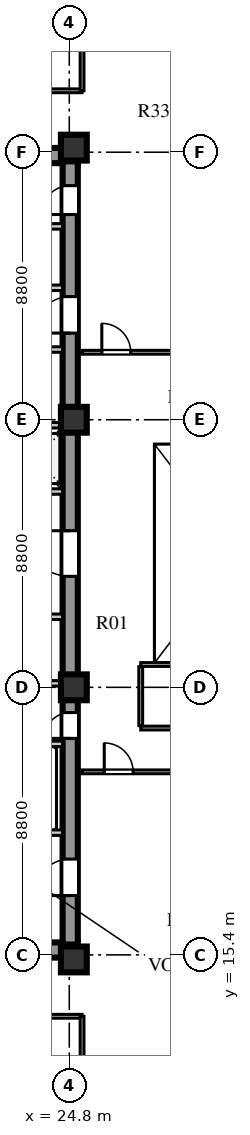
"""IFC4 building model, lengths in metres.
Left out: names, types, materials, properties, quantities, classifications, styles, units other than length and angle.
Written with IfcOpenShell. Run it as: python <this file> out.ifc"""

import sys

from ifc_helpers import new_model, si_unit, direction, frame, frame_2d, origin, origin_2d, place, context, subcontext, project, spatial, rectangle, extrude, element, fill, save


model = new_model("IFC4")
c1 = context("Model", 3, precision=1e-05, world=origin(), true_north=direction((0.0, 1.0)))
c2 = subcontext(c1, "Body", "Model", "MODEL_VIEW")
j1 = project(units=[si_unit("LENGTHUNIT", "METRE"), si_unit("PLANEANGLEUNIT", "RADIAN")], contexts=[c1])
p1 = place(None, origin())
s1 = spatial("IfcSite", under=j1, at=p1, CompositionType="ELEMENT")
p2 = place(p1, origin())
s2 = spatial("IfcBuilding", under=s1, at=p2, CompositionType="ELEMENT")
p3 = place(p2, frame((0.0, 0.0, 165.6)))
s3 = spatial("IfcBuildingStorey", under=s2, at=p3, CompositionType="ELEMENT", Elevation=165.6)
for number, where, z_axis, x_axis in (
    (1, (15.4, 15.56, 0.0), (0.0, 0.0, 1.0), (1.0, 0.0, 0.0)),
    (2, (15.4, 41.69, 0.0), (0.0, 0.0, 1.0), (1.0, 0.0, 0.0)),
):
    element("IfcWall", number, at=place(p3, frame(where, z_axis=z_axis, x_axis=x_axis)), inside=s3, PredefinedType="SHEAR", context=c2, shape_type="SweptSolid", body=[
        extrude(rectangle(XDim=9.68, YDim=0.5, at=frame_2d((4.84, 0.0))), origin(), (0.0, 0.0, 1.0), 3.6),
    ])
p4 = place(p3, frame((24.83, 15.74, 0.0), z_axis=(0.0, 0.0, 1.0), x_axis=(0.0, 1.0, 0.0)))
e3 = element("IfcWall", 3, at=p4, inside=s3, PredefinedType="SHEAR", context=c2, shape_type="SweptSolid", body=[
    extrude(rectangle(XDim=25.76, YDim=0.5, at=frame_2d((12.88, 0.0))), origin(), (0.0, 0.0, 1.0), 3.6),
])
p5 = place(p4, frame((1.61, 0.0, 0.0)))
e4 = element("IfcOpeningElement", 4, at=p5, cuts=e3, PredefinedType="OPENING", context=c2, shape_type="SweptSolid", body=[
    extrude(rectangle(XDim=1.2, YDim=2.1, at=frame_2d((0.6, 1.05))), frame((0.0, 0.26, 0.0), z_axis=(0.0, -1.0, 0.0), x_axis=(1.0, 0.0, 0.0)), (0.0, 0.0, 1.0), 0.52),
])
p6 = place(p4, frame((6.78, 0.0, 0.0)))
e5 = element("IfcOpeningElement", 5, at=p6, cuts=e3, PredefinedType="OPENING", context=c2, shape_type="SweptSolid", body=[
    extrude(rectangle(XDim=0.85, YDim=2.06, at=frame_2d((0.425, 1.03))), frame((0.0, 0.26, 0.0), z_axis=(0.0, -1.0, 0.0), x_axis=(1.0, 0.0, 0.0)), (0.0, 0.0, 1.0), 0.52),
])
p7 = place(p4, frame((12.11, 0.0, 0.0)))
e6 = element("IfcOpeningElement", 6, at=p7, cuts=e3, PredefinedType="OPENING", context=c2, shape_type="SweptSolid", body=[
    extrude(rectangle(XDim=1.5, YDim=2.12, at=frame_2d((0.75, 1.06))), frame((0.0, 0.26, 0.0), z_axis=(0.0, -1.0, 0.0), x_axis=(1.0, 0.0, 0.0)), (0.0, 0.0, 1.0), 0.52),
])
p8 = place(p4, frame((20.11, 0.0, 0.0)))
e7 = element("IfcOpeningElement", 7, at=p8, cuts=e3, PredefinedType="OPENING", context=c2, shape_type="SweptSolid", body=[
    extrude(rectangle(XDim=1.2, YDim=2.12, at=frame_2d((0.6, 1.06))), frame((0.0, 0.26, 0.0), z_axis=(0.0, -1.0, 0.0), x_axis=(1.0, 0.0, 0.0)), (0.0, 0.0, 1.0), 0.52),
])
p9 = place(p4, frame((24.01, 0.0, 0.0)))
e8 = element("IfcOpeningElement", 8, at=p9, cuts=e3, PredefinedType="OPENING", context=c2, shape_type="SweptSolid", body=[
    extrude(rectangle(XDim=0.95, YDim=2.1, at=frame_2d((0.475, 1.05))), frame((0.0, 0.26, 0.0), z_axis=(0.0, -1.0, 0.0), x_axis=(1.0, 0.0, 0.0)), (0.0, 0.0, 1.0), 0.52),
])
for number, where, z_axis, x_axis in (
    (9, (24.95, 15.25, 0.0), (0.0, 0.0, 1.0), (1.0, 0.0, 0.0)),
    (10, (24.95, 24.2, 0.0), (0.0, 0.0, 1.0), (1.0, 0.0, 0.0)),
    (11, (24.95, 33.0, 0.0), (0.0, 0.0, 1.0), (1.0, 0.0, 0.0)),
    (12, (24.95, 41.95, 0.0), (0.0, 0.0, 1.0), (1.0, 0.0, 0.0)),
):
    element("IfcColumn", number, at=place(p3, frame(where, z_axis=z_axis, x_axis=x_axis)), inside=s3, PredefinedType="COLUMN", context=c2, shape_type="SweptSolid", body=[
        extrude(rectangle(XDim=0.85, YDim=0.85, at=origin_2d()), origin(), (0.0, 0.0, 1.0), 3.6),
    ])
p10 = place(p3, frame((19.64, 19.42, 0.0), z_axis=(0.0, 0.0, 1.0), x_axis=(1.0, 0.0, 0.0)))
e13 = element("IfcWall", 13, at=p10, inside=s3, PredefinedType="SOLIDWALL", context=c2, shape_type="SweptSolid", body=[
    extrude(rectangle(XDim=4.94, YDim=0.18, at=frame_2d((2.47, 0.0))), origin(), (0.0, 0.0, 1.0), 3.6),
])
p11 = place(p10, frame((0.72, 0.0, 0.0)))
e14 = element("IfcOpeningElement", 14, at=p11, cuts=e13, PredefinedType="OPENING", context=c2, shape_type="SweptSolid", body=[
    extrude(rectangle(XDim=1.1, YDim=2.1, at=frame_2d((0.55, 1.05))), frame((0.0, 0.1, 0.0), z_axis=(0.0, -1.0, 0.0), x_axis=(1.0, 0.0, 0.0)), (0.0, 0.0, 1.0), 0.2),
])
p12 = place(p10, frame((3.02, 0.0, 0.0)))
e15 = element("IfcOpeningElement", 15, at=p12, cuts=e13, PredefinedType="OPENING", context=c2, shape_type="SweptSolid", body=[
    extrude(rectangle(XDim=1.1, YDim=2.1, at=frame_2d((0.55, 1.05))), frame((0.0, 0.1, 0.0), z_axis=(0.0, -1.0, 0.0), x_axis=(1.0, 0.0, 0.0)), (0.0, 0.0, 1.0), 0.2),
])
p13 = place(p3, frame((19.64, 22.34, 0.0), z_axis=(0.0, 0.0, 1.0), x_axis=(1.0, 0.0, 0.0)))
e16 = element("IfcWall", 16, at=p13, inside=s3, PredefinedType="SOLIDWALL", context=c2, shape_type="SweptSolid", body=[
    extrude(rectangle(XDim=4.94, YDim=0.18, at=frame_2d((2.47, 0.0))), origin(), (0.0, 0.0, 1.0), 3.6),
])
p14 = place(p3, frame((15.9, 26.52, 0.0), z_axis=(0.0, 0.0, 1.0), x_axis=(1.0, 0.0, 0.0)))
e17 = element("IfcWall", 17, at=p14, inside=s3, PredefinedType="SOLIDWALL", context=c2, shape_type="SweptSolid", body=[
    extrude(rectangle(XDim=8.68, YDim=0.18, at=frame_2d((4.34, 0.0))), origin(), (0.0, 0.0, 1.0), 3.6),
])
p15 = place(p14, frame((2.5, 0.0, 0.0)))
e18 = element("IfcOpeningElement", 18, at=p15, cuts=e17, PredefinedType="OPENING", context=c2, shape_type="SweptSolid", body=[
    extrude(rectangle(XDim=0.95, YDim=2.1, at=frame_2d((0.475, 1.05))), frame((0.0, 0.1, 0.0), z_axis=(0.0, -1.0, 0.0), x_axis=(1.0, 0.0, 0.0)), (0.0, 0.0, 1.0), 0.2),
])
p16 = place(p14, frame((6.0, 0.0, 0.0)))
e19 = element("IfcOpeningElement", 19, at=p16, cuts=e17, PredefinedType="OPENING", context=c2, shape_type="SweptSolid", body=[
    extrude(rectangle(XDim=0.95, YDim=2.1, at=frame_2d((0.475, 1.05))), frame((0.0, 0.1, 0.0), z_axis=(0.0, -1.0, 0.0), x_axis=(1.0, 0.0, 0.0)), (0.0, 0.0, 1.0), 0.2),
])
p17 = place(p3, frame((15.9, 24.33, 0.0), z_axis=(0.0, 0.0, 1.0), x_axis=(1.0, 0.0, 0.0)))
e20 = element("IfcWall", 20, at=p17, inside=s3, PredefinedType="SOLIDWALL", context=c2, shape_type="SweptSolid", body=[
    extrude(rectangle(XDim=8.68, YDim=0.18, at=frame_2d((4.34, 0.0))), origin(), (0.0, 0.0, 1.0), 2.95),
])
p18 = place(p3, frame((15.9, 30.64, 0.0), z_axis=(0.0, 0.0, 1.0), x_axis=(1.0, 0.0, 0.0)))
e21 = element("IfcWall", 21, at=p18, inside=s3, PredefinedType="SOLIDWALL", context=c2, shape_type="SweptSolid", body=[
    extrude(rectangle(XDim=8.68, YDim=0.18, at=frame_2d((4.34, 0.0))), origin(), (0.0, 0.0, 1.0), 3.6),
])
p19 = place(p18, frame((1.76, 0.0, 0.0)))
e22 = element("IfcOpeningElement", 22, at=p19, cuts=e21, PredefinedType="OPENING", context=c2, shape_type="SweptSolid", body=[
    extrude(rectangle(XDim=1.0, YDim=2.1, at=frame_2d((0.5, 1.05))), frame((0.0, 0.1, 0.0), z_axis=(0.0, -1.0, 0.0), x_axis=(1.0, 0.0, 0.0)), (0.0, 0.0, 1.0), 0.2),
])
p20 = place(p18, frame((3.6, 0.0, 0.0)))
e23 = element("IfcOpeningElement", 23, at=p20, cuts=e21, PredefinedType="OPENING", context=c2, shape_type="SweptSolid", body=[
    extrude(rectangle(XDim=1.0, YDim=2.1, at=frame_2d((0.5, 1.05))), frame((0.0, 0.1, 0.0), z_axis=(0.0, -1.0, 0.0), x_axis=(1.0, 0.0, 0.0)), (0.0, 0.0, 1.0), 0.2),
])
p21 = place(p18, frame((5.44, 0.0, 0.0)))
e24 = element("IfcOpeningElement", 24, at=p21, cuts=e21, PredefinedType="OPENING", context=c2, shape_type="SweptSolid", body=[
    extrude(rectangle(XDim=1.0, YDim=2.1, at=frame_2d((0.5, 1.05))), frame((0.0, 0.1, 0.0), z_axis=(0.0, -1.0, 0.0), x_axis=(1.0, 0.0, 0.0)), (0.0, 0.0, 1.0), 0.2),
])
p22 = place(p18, frame((7.28, 0.0, 0.0)))
e25 = element("IfcOpeningElement", 25, at=p22, cuts=e21, PredefinedType="OPENING", context=c2, shape_type="SweptSolid", body=[
    extrude(rectangle(XDim=1.0, YDim=2.1, at=frame_2d((0.5, 1.05))), frame((0.0, 0.1, 0.0), z_axis=(0.0, -1.0, 0.0), x_axis=(1.0, 0.0, 0.0)), (0.0, 0.0, 1.0), 0.2),
])
p23 = place(p3, frame((15.9, 32.82, 0.0), z_axis=(0.0, 0.0, 1.0), x_axis=(1.0, 0.0, 0.0)))
e26 = element("IfcWall", 26, at=p23, inside=s3, PredefinedType="SOLIDWALL", context=c2, shape_type="SweptSolid", body=[
    extrude(rectangle(XDim=8.68, YDim=0.18, at=frame_2d((4.34, 0.0))), origin(), (0.0, 0.0, 1.0), 2.95),
])
p24 = place(p3, frame((22.02, 35.31, 0.0), z_axis=(0.0, 0.0, 1.0), x_axis=(1.0, 0.0, 0.0)))
e27 = element("IfcWall", 27, at=p24, inside=s3, PredefinedType="SOLIDWALL", context=c2, shape_type="SweptSolid", body=[
    extrude(rectangle(XDim=2.56, YDim=0.18, at=frame_2d((1.28, 0.0))), origin(), (0.0, 0.0, 1.0), 3.6),
])
p25 = place(p24, frame((0.55, 0.0, 0.0)))
e28 = element("IfcOpeningElement", 28, at=p25, cuts=e27, PredefinedType="OPENING", context=c2, shape_type="SweptSolid", body=[
    extrude(rectangle(XDim=1.0, YDim=2.1, at=frame_2d((0.5, 1.05))), frame((0.0, 0.1, 0.0), z_axis=(0.0, -1.0, 0.0), x_axis=(1.0, 0.0, 0.0)), (0.0, 0.0, 1.0), 0.2),
])
p26 = place(p3, frame((19.64, 37.34, 0.0), z_axis=(0.0, 0.0, 1.0), x_axis=(1.0, 0.0, 0.0)))
e29 = element("IfcWall", 29, at=p26, inside=s3, PredefinedType="SOLIDWALL", context=c2, shape_type="SweptSolid", body=[
    extrude(rectangle(XDim=4.94, YDim=0.18, at=frame_2d((2.47, 0.0))), origin(), (0.0, 0.0, 1.0), 3.6),
])
p27 = place(p26, frame((0.45, 0.0, 0.0)))
e30 = element("IfcOpeningElement", 30, at=p27, cuts=e29, PredefinedType="OPENING", context=c2, shape_type="SweptSolid", body=[
    extrude(rectangle(XDim=1.0, YDim=2.1, at=frame_2d((0.5, 1.05))), frame((0.0, 0.1, 0.0), z_axis=(0.0, -1.0, 0.0), x_axis=(1.0, 0.0, 0.0)), (0.0, 0.0, 1.0), 0.2),
])
p28 = place(p26, frame((2.5, 0.0, 0.0)))
e31 = element("IfcOpeningElement", 31, at=p28, cuts=e29, PredefinedType="OPENING", context=c2, shape_type="SweptSolid", body=[
    extrude(rectangle(XDim=1.0, YDim=2.1, at=frame_2d((0.5, 1.05))), frame((0.0, 0.1, 0.0), z_axis=(0.0, -1.0, 0.0), x_axis=(1.0, 0.0, 0.0)), (0.0, 0.0, 1.0), 0.2),
])
p29 = place(p3, frame((19.64, 39.36, 0.0), z_axis=(0.0, 0.0, 1.0), x_axis=(1.0, 0.0, 0.0)))
e32 = element("IfcWall", 32, at=p29, inside=s3, PredefinedType="SOLIDWALL", context=c2, shape_type="SweptSolid", body=[
    extrude(rectangle(XDim=4.94, YDim=0.18, at=frame_2d((2.47, 0.0))), origin(), (0.0, 0.0, 1.0), 3.6),
])
p30 = place(p3, frame((25.22, 21.42, 0.0), z_axis=(0.0, 0.0, 1.0), x_axis=(1.0, 0.0, 0.0)))
e33 = element("IfcWall", 33, at=p30, inside=s3, PredefinedType="PLUMBINGWALL", context=c2, shape_type="SweptSolid", body=[
    extrude(rectangle(XDim=15.6, YDim=0.125, at=frame_2d((7.8, 0.0))), origin(), (0.0, 0.0, 1.0), 3.25),
])
p31 = place(p30, frame((0.73, 0.0, 0.0)))
e34 = element("IfcOpeningElement", 34, at=p31, cuts=e33, PredefinedType="OPENING", context=c2, shape_type="SweptSolid", body=[
    extrude(rectangle(XDim=0.95, YDim=2.1, at=frame_2d((0.475, 1.05))), frame((0.0, 0.073, 0.0), z_axis=(0.0, -1.0, 0.0), x_axis=(1.0, 0.0, 0.0)), (0.0, 0.0, 1.0), 0.145),
])
p32 = place(p30, frame((7.23, 0.0, 0.0)))
e35 = element("IfcOpeningElement", 35, at=p32, cuts=e33, PredefinedType="OPENING", context=c2, shape_type="SweptSolid", body=[
    extrude(rectangle(XDim=0.95, YDim=2.1, at=frame_2d((0.475, 1.05))), frame((0.0, 0.073, 0.0), z_axis=(0.0, -1.0, 0.0), x_axis=(1.0, 0.0, 0.0)), (0.0, 0.0, 1.0), 0.145),
])
p33 = place(p3, frame((27.15, 22.86, 0.0), z_axis=(0.0, 0.0, 1.0), x_axis=(1.0, 0.0, 0.0)))
e36 = element("IfcWall", 36, at=p33, inside=s3, PredefinedType="PLUMBINGWALL", context=c2, shape_type="SweptSolid", body=[
    extrude(rectangle(XDim=13.67, YDim=0.125, at=frame_2d((6.835, 0.0))), origin(), (0.0, 0.0, 1.0), 3.6),
])
p34 = place(p33, frame((2.2, 0.0, 0.0)))
e37 = element("IfcOpeningElement", 37, at=p34, cuts=e36, PredefinedType="OPENING", context=c2, shape_type="SweptSolid", body=[
    extrude(rectangle(XDim=0.9, YDim=2.08, at=frame_2d((0.45, 1.04))), frame((0.0, 0.073, 0.0), z_axis=(0.0, -1.0, 0.0), x_axis=(1.0, 0.0, 0.0)), (0.0, 0.0, 1.0), 0.145),
])
p35 = place(p3, frame((25.22, 35.22, 0.0), z_axis=(0.0, 0.0, 1.0), x_axis=(1.0, 0.0, 0.0)))
e38 = element("IfcWall", 38, at=p35, inside=s3, PredefinedType="PLUMBINGWALL", context=c2, shape_type="SweptSolid", body=[
    extrude(rectangle(XDim=9.5, YDim=0.125, at=frame_2d((4.75, 0.0))), origin(), (0.0, 0.0, 1.0), 3.6),
])
p36 = place(p35, frame((0.65, 0.0, 0.0)))
e39 = element("IfcOpeningElement", 39, at=p36, cuts=e38, PredefinedType="OPENING", context=c2, shape_type="SweptSolid", body=[
    extrude(rectangle(XDim=0.95, YDim=2.1, at=frame_2d((0.475, 1.05))), frame((0.0, 0.073, 0.0), z_axis=(0.0, -1.0, 0.0), x_axis=(1.0, 0.0, 0.0)), (0.0, 0.0, 1.0), 0.145),
])
p37 = place(p35, frame((5.2, 0.0, 0.0)))
e40 = element("IfcOpeningElement", 40, at=p37, cuts=e38, PredefinedType="OPENING", context=c2, shape_type="SweptSolid", body=[
    extrude(rectangle(XDim=0.95, YDim=2.1, at=frame_2d((0.475, 1.05))), frame((0.0, 0.073, 0.0), z_axis=(0.0, -1.0, 0.0), x_axis=(1.0, 0.0, 0.0)), (0.0, 0.0, 1.0), 0.145),
])
p38 = place(p3, frame((13.39, 13.38, 0.0), z_axis=(0.0, 0.0, 1.0), x_axis=(1.0, 0.0, 0.0)))
e41 = element("IfcWall", 41, at=p38, inside=s3, PredefinedType="PLUMBINGWALL", context=c2, shape_type="SweptSolid", body=[
    extrude(rectangle(XDim=11.83, YDim=0.125, at=frame_2d((5.915, 0.0))), origin(), (0.0, 0.0, 1.0), 3.6),
])
p39 = place(p38, frame((4.76, 0.0, 0.0)))
e42 = element("IfcOpeningElement", 42, at=p39, cuts=e41, PredefinedType="OPENING", context=c2, shape_type="SweptSolid", body=[
    extrude(rectangle(XDim=1.0, YDim=2.08, at=frame_2d((0.5, 1.04))), frame((0.0, 0.073, 0.0), z_axis=(0.0, -1.0, 0.0), x_axis=(1.0, 0.0, 0.0)), (0.0, 0.0, 1.0), 0.145),
])
p40 = place(p3, frame((25.22, 7.88, 0.0), z_axis=(0.0, 0.0, 1.0), x_axis=(0.0, 1.0, 0.0)))
e43 = element("IfcWall", 43, at=p40, inside=s3, PredefinedType="PLUMBINGWALL", context=c2, shape_type="SweptSolid", body=[
    extrude(rectangle(XDim=5.5, YDim=0.125, at=frame_2d((2.75, 0.0))), origin(), (0.0, 0.0, 1.0), 3.15),
])
p41 = place(p3, frame((13.39, 43.82, 0.0), z_axis=(0.0, 0.0, 1.0), x_axis=(1.0, 0.0, 0.0)))
e44 = element("IfcWall", 44, at=p41, inside=s3, PredefinedType="PLUMBINGWALL", context=c2, shape_type="SweptSolid", body=[
    extrude(rectangle(XDim=11.83, YDim=0.125, at=frame_2d((5.915, 0.0))), origin(), (0.0, 0.0, 1.0), 3.6),
])
p42 = place(p41, frame((4.76, 0.0, 0.0)))
e45 = element("IfcOpeningElement", 45, at=p42, cuts=e44, PredefinedType="OPENING", context=c2, shape_type="SweptSolid", body=[
    extrude(rectangle(XDim=1.0, YDim=2.08, at=frame_2d((0.5, 1.04))), frame((0.0, 0.073, 0.0), z_axis=(0.0, -1.0, 0.0), x_axis=(1.0, 0.0, 0.0)), (0.0, 0.0, 1.0), 0.145),
])
p43 = place(p3, frame((25.22, 43.82, 0.0), z_axis=(0.0, 0.0, 1.0), x_axis=(0.0, 1.0, 0.0)))
e46 = element("IfcWall", 46, at=p43, inside=s3, PredefinedType="PLUMBINGWALL", context=c2, shape_type="SweptSolid", body=[
    extrude(rectangle(XDim=5.5, YDim=0.125, at=frame_2d((2.75, 0.0))), origin(), (0.0, 0.0, 1.0), 3.15),
])
p44 = place(p3, frame((27.15, 24.95, 0.0), z_axis=(0.0, 0.0, 1.0), x_axis=(1.0, 0.0, 0.0)))
e47 = element("IfcWall", 47, at=p44, inside=s3, PredefinedType="PLUMBINGWALL", context=c2, shape_type="SweptSolid", body=[
    extrude(rectangle(XDim=9.67, YDim=0.125, at=frame_2d((4.835, 0.0))), origin(), (0.0, 0.0, 1.0), 3.05),
])
p45 = place(p3, frame((27.15, 22.94, 0.0), z_axis=(0.0, 0.0, 1.0), x_axis=(0.0, 1.0, 0.0)))
e48 = element("IfcWall", 48, at=p45, inside=s3, PredefinedType="PLUMBINGWALL", context=c2, shape_type="SweptSolid", body=[
    extrude(rectangle(XDim=1.94, YDim=0.125, at=frame_2d((0.97, 0.0))), origin(), (0.0, 0.0, 1.0), 3.6),
])
p46 = place(p5, frame((1.2, 0.0, 0.0), z_axis=(0.0, 0.0, 1.0), x_axis=(-1.0, 0.0, 0.0)))
e49 = element("IfcDoor", 49, at=p46, inside=s3, OperationType="SINGLE_SWING_RIGHT", PredefinedType="DOOR", context=c2, shape_type="SweptSolid", body=[
    extrude(rectangle(XDim=1.2, YDim=2.1, at=frame_2d((0.6, 1.05))), frame((0.0, 0.025, 0.0), z_axis=(0.0, -1.0, 0.0), x_axis=(1.0, 0.0, 0.0)), (0.0, 0.0, 1.0), 0.05),
])
fill(e4, e49)
p47 = place(p6, frame((0.85, 0.0, 0.0), z_axis=(0.0, 0.0, 1.0), x_axis=(-1.0, 0.0, 0.0)))
e50 = element("IfcDoor", 50, at=p47, inside=s3, OperationType="SINGLE_SWING_RIGHT", PredefinedType="DOOR", context=c2, shape_type="SweptSolid", body=[
    extrude(rectangle(XDim=0.85, YDim=2.06, at=frame_2d((0.425, 1.03))), frame((0.0, 0.025, 0.0), z_axis=(0.0, -1.0, 0.0), x_axis=(1.0, 0.0, 0.0)), (0.0, 0.0, 1.0), 0.05),
])
fill(e5, e50)
p48 = place(p7, frame((1.5, 0.0, 0.0), z_axis=(0.0, 0.0, 1.0), x_axis=(-1.0, 0.0, 0.0)))
e51 = element("IfcDoor", 51, at=p48, inside=s3, OperationType="SINGLE_SWING_LEFT", PredefinedType="DOOR", context=c2, shape_type="SweptSolid", body=[
    extrude(rectangle(XDim=1.5, YDim=2.12, at=frame_2d((0.75, 1.06))), frame((0.0, 0.025, 0.0), z_axis=(0.0, -1.0, 0.0), x_axis=(1.0, 0.0, 0.0)), (0.0, 0.0, 1.0), 0.05),
])
fill(e6, e51)
p49 = place(p8, frame((1.2, 0.0, 0.0), z_axis=(0.0, 0.0, 1.0), x_axis=(-1.0, 0.0, 0.0)))
e52 = element("IfcDoor", 52, at=p49, inside=s3, OperationType="SINGLE_SWING_RIGHT", PredefinedType="DOOR", context=c2, shape_type="SweptSolid", body=[
    extrude(rectangle(XDim=1.2, YDim=2.12, at=frame_2d((0.6, 1.06))), frame((0.0, 0.025, 0.0), z_axis=(0.0, -1.0, 0.0), x_axis=(1.0, 0.0, 0.0)), (0.0, 0.0, 1.0), 0.05),
])
fill(e7, e52)
p50 = place(p9, frame((0.95, 0.0, 0.0), z_axis=(0.0, 0.0, 1.0), x_axis=(-1.0, 0.0, 0.0)))
e53 = element("IfcDoor", 53, at=p50, inside=s3, OperationType="SINGLE_SWING_RIGHT", PredefinedType="DOOR", context=c2, shape_type="SweptSolid", body=[
    extrude(rectangle(XDim=0.95, YDim=2.1, at=frame_2d((0.475, 1.05))), frame((0.0, 0.025, 0.0), z_axis=(0.0, -1.0, 0.0), x_axis=(1.0, 0.0, 0.0)), (0.0, 0.0, 1.0), 0.05),
])
fill(e8, e53)
p51 = place(p31, frame((0.95, 0.0, 0.0), z_axis=(0.0, 0.0, 1.0), x_axis=(-1.0, 0.0, 0.0)))
e54 = element("IfcDoor", 54, at=p51, inside=s3, OperationType="SINGLE_SWING_RIGHT", PredefinedType="DOOR", context=c2, shape_type="SweptSolid", body=[
    extrude(rectangle(XDim=0.95, YDim=2.1, at=frame_2d((0.475, 1.05))), frame((0.0, 0.025, 0.0), z_axis=(0.0, -1.0, 0.0), x_axis=(1.0, 0.0, 0.0)), (0.0, 0.0, 1.0), 0.05),
])
fill(e34, e54)
p52 = place(p36, origin())
e55 = element("IfcDoor", 55, at=p52, inside=s3, OperationType="SINGLE_SWING_LEFT", PredefinedType="DOOR", context=c2, shape_type="SweptSolid", body=[
    extrude(rectangle(XDim=0.95, YDim=2.1, at=frame_2d((0.475, 1.05))), frame((0.0, 0.025, 0.0), z_axis=(0.0, -1.0, 0.0), x_axis=(1.0, 0.0, 0.0)), (0.0, 0.0, 1.0), 0.05),
])
fill(e39, e55)
save(model, sys.argv[1])
